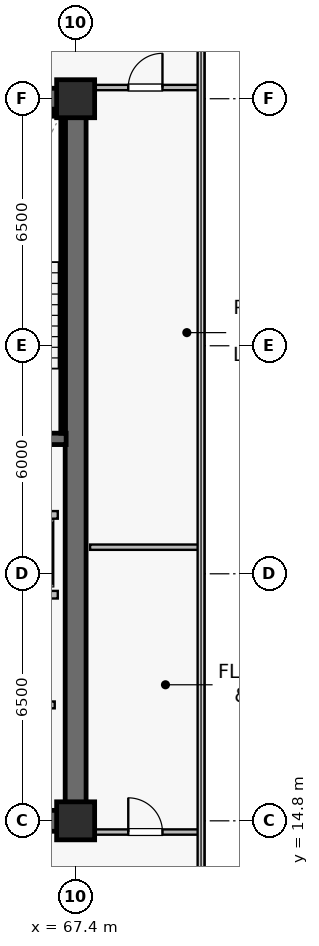
"""IFC4 building model, lengths in metres.
Left out: names, types, materials, properties, quantities, classifications, styles, units other than length and angle.
Written with IfcOpenShell. Run it as: python <this file> out.ifc"""

import sys

from ifc_helpers import new_model, si_unit, direction, frame, frame_2d, origin, origin_2d, place, context, subcontext, project, spatial, rectangle, extrude, source, transform, mapped, element, fill, save


model = new_model("IFC4")
c1 = context("Model", 3, precision=1e-05, world=origin(), true_north=direction((0.0, 1.0)))
c2 = subcontext(c1, "Body", "Model", "MODEL_VIEW")
j1 = project(units=[si_unit("LENGTHUNIT", "METRE"), si_unit("PLANEANGLEUNIT", "RADIAN")], contexts=[c1])
p1 = place(None, origin())
s1 = spatial("IfcSite", under=j1, at=p1, CompositionType="ELEMENT")
p2 = place(p1, origin())
s2 = spatial("IfcBuilding", under=s1, at=p2, CompositionType="ELEMENT")
p3 = place(p2, frame((0.0, 0.0, 238.3)))
s3 = spatial("IfcBuildingStorey", under=s2, at=p3, CompositionType="ELEMENT", Elevation=238.3)
p4 = place(p3, frame((52.325, 14.8, 0.0), z_axis=(0.0, 0.0, 1.0), x_axis=(1.0, 0.0, 0.0)))
e1 = element("IfcWall", 1, at=p4, inside=s3, PredefinedType="SHEAR", context=c2, shape_type="SweptSolid", body=[
    extrude(rectangle(XDim=15.35, YDim=0.55, at=frame_2d((7.675, 0.0))), origin(), (0.0, 0.0, 1.0), 3.8),
])
p5 = place(p3, frame((52.325, 33.8, 0.0), z_axis=(0.0, 0.0, 1.0), x_axis=(1.0, 0.0, 0.0)))
e2 = element("IfcWall", 2, at=p5, inside=s3, PredefinedType="SHEAR", context=c2, shape_type="SweptSolid", body=[
    extrude(rectangle(XDim=15.35, YDim=0.55, at=frame_2d((7.675, 0.0))), origin(), (0.0, 0.0, 1.0), 3.8),
])
p6 = place(p5, frame((8.775, 0.0, 0.0)))
e3 = element("IfcOpeningElement", 3, at=p6, cuts=e2, PredefinedType="OPENING", context=c2, shape_type="SweptSolid", body=[
    extrude(rectangle(XDim=0.95, YDim=2.15, at=frame_2d((0.475, 1.075))), frame((0.0, 0.285, 0.0), z_axis=(0.0, -1.0, 0.0), x_axis=(1.0, 0.0, 0.0)), (0.0, 0.0, 1.0), 0.57),
])
p7 = place(p5, frame((5.41, 0.0, 0.0)))
e4 = element("IfcOpeningElement", 4, at=p7, cuts=e2, PredefinedType="OPENING", context=c2, shape_type="SweptSolid", body=[
    extrude(rectangle(XDim=0.95, YDim=2.15, at=frame_2d((0.475, 1.075))), frame((0.0, 0.285, 0.0), z_axis=(0.0, -1.0, 0.0), x_axis=(1.0, 0.0, 0.0)), (0.0, 0.0, 1.0), 0.57),
])
p8 = place(p5, frame((2.01, 0.0, 0.0)))
e5 = element("IfcOpeningElement", 5, at=p8, cuts=e2, PredefinedType="OPENING", context=c2, shape_type="SweptSolid", body=[
    extrude(rectangle(XDim=0.95, YDim=2.15, at=frame_2d((0.475, 1.075))), frame((0.0, 0.285, 0.0), z_axis=(0.0, -1.0, 0.0), x_axis=(1.0, 0.0, 0.0)), (0.0, 0.0, 1.0), 0.57),
])
p9 = place(p3, frame((67.4, 15.075, 0.0), z_axis=(0.0, 0.0, 1.0), x_axis=(0.0, 1.0, 0.0)))
e6 = element("IfcWall", 6, at=p9, inside=s3, PredefinedType="SHEAR", context=c2, shape_type="SweptSolid", body=[
    extrude(rectangle(XDim=18.45, YDim=0.55, at=frame_2d((9.225, 0.0))), origin(), (0.0, 0.0, 1.0), 3.8),
])
p10 = place(p3, frame((63.35, 24.85, 0.0), z_axis=(0.0, 0.0, 1.0), x_axis=(1.0, 0.0, 0.0)))
e7 = element("IfcWall", 7, at=p10, inside=s3, PredefinedType="SHEAR", context=c2, shape_type="SweptSolid", body=[
    extrude(rectangle(XDim=3.8, YDim=0.3, at=frame_2d((1.9, 0.0))), origin(), (0.0, 0.0, 1.0), 3.8),
])
p11 = place(p3, frame((63.35, 33.4, 0.0), z_axis=(0.0, 0.0, 1.0), x_axis=(1.0, 0.0, 0.0)))
e8 = element("IfcWall", 8, at=p11, inside=s3, PredefinedType="SOLIDWALL", context=c2, shape_type="SweptSolid", body=[
    extrude(rectangle(XDim=3.72, YDim=0.12, at=frame_2d((1.86, 0.0))), origin(), (0.0, 0.0, 1.0), 3.8),
])
p12 = place(p3, frame((67.07, 25.0, 0.0), z_axis=(0.0, 0.0, 1.0), x_axis=(0.0, 1.0, 0.0)))
e9 = element("IfcWall", 9, at=p12, inside=s3, PredefinedType="SOLIDWALL", context=c2, shape_type="SweptSolid", body=[
    extrude(rectangle(XDim=8.32, YDim=0.12, at=frame_2d((4.16, 0.0))), origin(), (0.0, 0.0, 1.0), 3.8),
])
m1 = source(origin(), c2, "Body", "SweptSolid", [
    extrude(rectangle(XDim=1.0, YDim=1.0, at=origin_2d()), origin(), (0.0, 0.0, 1.0), 4.1),
])
for number, where, z_axis, x_axis in (
    (10, (67.4, 14.8, 0.0), (0.0, 0.0, 1.0), (1.0, 0.0, 0.0)),
    (11, (67.4, 33.8, 0.0), (0.0, 0.0, 1.0), (1.0, 0.0, 0.0)),
):
    element("IfcColumn", number, at=place(p3, frame(where, z_axis=z_axis, x_axis=x_axis)), inside=s3, PredefinedType="COLUMN", context=c2, shape_type="MappedRepresentation", body=[
        mapped(m1, transform((0.0, 0.0, 0.0), scale=1.0)),
    ])
p13 = place(p3, frame((64.67, 20.75, 0.0), z_axis=(0.0, 0.0, 1.0), x_axis=(1.0, 0.0, 0.0)))
e12 = element("IfcWall", 12, at=p13, inside=s3, PredefinedType="SOLIDWALL", context=c2, shape_type="SweptSolid", body=[
    extrude(rectangle(XDim=2.26, YDim=0.2, at=frame_2d((1.13, 0.0))), origin(), (0.0, 0.0, 1.0), 3.8),
])
p14 = place(p13, frame((0.58, 0.0, 0.0)))
e13 = element("IfcOpeningElement", 13, at=p14, cuts=e12, PredefinedType="OPENING", context=c2, shape_type="SweptSolid", body=[
    extrude(rectangle(XDim=1.1, YDim=2.22, at=frame_2d((0.55, 1.11))), frame((0.0, 0.11, 0.0), z_axis=(0.0, -1.0, 0.0), x_axis=(1.0, 0.0, 0.0)), (0.0, 0.0, 1.0), 0.22),
])
p15 = place(p3, frame((64.67, 22.85, 0.0), z_axis=(0.0, 0.0, 1.0), x_axis=(1.0, 0.0, 0.0)))
e14 = element("IfcWall", 14, at=p15, inside=s3, PredefinedType="SOLIDWALL", context=c2, shape_type="SweptSolid", body=[
    extrude(rectangle(XDim=2.26, YDim=0.2, at=frame_2d((1.13, 0.0))), origin(), (0.0, 0.0, 1.0), 3.8),
])
p16 = place(p3, frame((61.85, 17.85, 0.0), z_axis=(0.0, 0.0, 1.0), x_axis=(1.0, 0.0, 0.0)))
e15 = element("IfcWall", 15, at=p16, inside=s3, PredefinedType="SOLIDWALL", context=c2, shape_type="SweptSolid", body=[
    extrude(rectangle(XDim=5.0, YDim=0.18, at=frame_2d((2.5, 0.0))), origin(), (0.0, 0.0, 1.0), 3.8),
])
p17 = place(p16, frame((2.025, 0.0, 0.0)))
e16 = element("IfcOpeningElement", 16, at=p17, cuts=e15, PredefinedType="OPENING", context=c2, shape_type="SweptSolid", body=[
    extrude(rectangle(XDim=0.95, YDim=2.15, at=frame_2d((0.475, 1.075))), frame((0.0, 0.1, 0.0), z_axis=(0.0, -1.0, 0.0), x_axis=(1.0, 0.0, 0.0)), (0.0, 0.0, 1.0), 0.2),
])
p18 = place(p3, frame((67.78, 22.0, 0.0), z_axis=(0.0, 0.0, 1.0), x_axis=(1.0, 0.0, 0.0)))
e17 = element("IfcWall", 17, at=p18, inside=s3, PredefinedType="PARTITIONING", context=c2, shape_type="SweptSolid", body=[
    extrude(rectangle(XDim=2.91, YDim=0.14, at=frame_2d((1.455, 0.0))), origin(), (0.0, 0.0, 1.0), 3.8),
])
p19 = place(p3, frame((67.78, 14.505, 0.0), z_axis=(0.0, 0.0, 1.0), x_axis=(1.0, 0.0, 0.0)))
e18 = element("IfcWall", 18, at=p19, inside=s3, PredefinedType="PARTITIONING", context=c2, shape_type="SweptSolid", body=[
    extrude(rectangle(XDim=2.91, YDim=0.14, at=frame_2d((1.455, 0.0))), origin(), (0.0, 0.0, 1.0), 3.8),
])
p20 = place(p19, frame((1.005, 0.0, 0.0)))
e19 = element("IfcOpeningElement", 19, at=p20, cuts=e18, PredefinedType="OPENING", context=c2, shape_type="SweptSolid", body=[
    extrude(rectangle(XDim=0.9, YDim=2.1, at=frame_2d((0.45, 1.05))), frame((0.0, 0.08, 0.0), z_axis=(0.0, -1.0, 0.0), x_axis=(1.0, 0.0, 0.0)), (0.0, 0.0, 1.0), 0.16),
])
p21 = place(p3, frame((67.78, 34.095, 0.0), z_axis=(0.0, 0.0, 1.0), x_axis=(1.0, 0.0, 0.0)))
e20 = element("IfcWall", 20, at=p21, inside=s3, PredefinedType="PARTITIONING", context=c2, shape_type="SweptSolid", body=[
    extrude(rectangle(XDim=2.91, YDim=0.14, at=frame_2d((1.455, 0.0))), origin(), (0.0, 0.0, 1.0), 3.8),
])
p22 = place(p21, frame((1.005, 0.0, 0.0)))
e21 = element("IfcOpeningElement", 21, at=p22, cuts=e20, PredefinedType="OPENING", context=c2, shape_type="SweptSolid", body=[
    extrude(rectangle(XDim=0.9, YDim=2.1, at=frame_2d((0.45, 1.05))), frame((0.0, 0.08, 0.0), z_axis=(0.0, -1.0, 0.0), x_axis=(1.0, 0.0, 0.0)), (0.0, 0.0, 1.0), 0.16),
])
m2 = source(origin(), c2, "Body", "SweptSolid", [
    extrude(rectangle(XDim=0.9, YDim=2.1, at=frame_2d((0.45, 1.05))), frame((0.0, 0.025, 0.0), z_axis=(0.0, -1.0, 0.0), x_axis=(1.0, 0.0, 0.0)), (0.0, 0.0, 1.0), 0.05),
])
p23 = place(p20, origin())
e22 = element("IfcDoor", 22, at=p23, inside=s3, OperationType="SINGLE_SWING_LEFT", PredefinedType="DOOR", context=c2, shape_type="MappedRepresentation", body=[
    mapped(m2, transform((0.0, 0.0, 0.0), scale=1.0)),
])
fill(e19, e22)
p24 = place(p22, origin())
e23 = element("IfcDoor", 23, at=p24, inside=s3, OperationType="SINGLE_SWING_RIGHT", PredefinedType="DOOR", context=c2, shape_type="MappedRepresentation", body=[
    mapped(m2, transform((0.0, 0.0, 0.0), scale=1.0)),
])
fill(e21, e23)
save(model, sys.argv[1])
